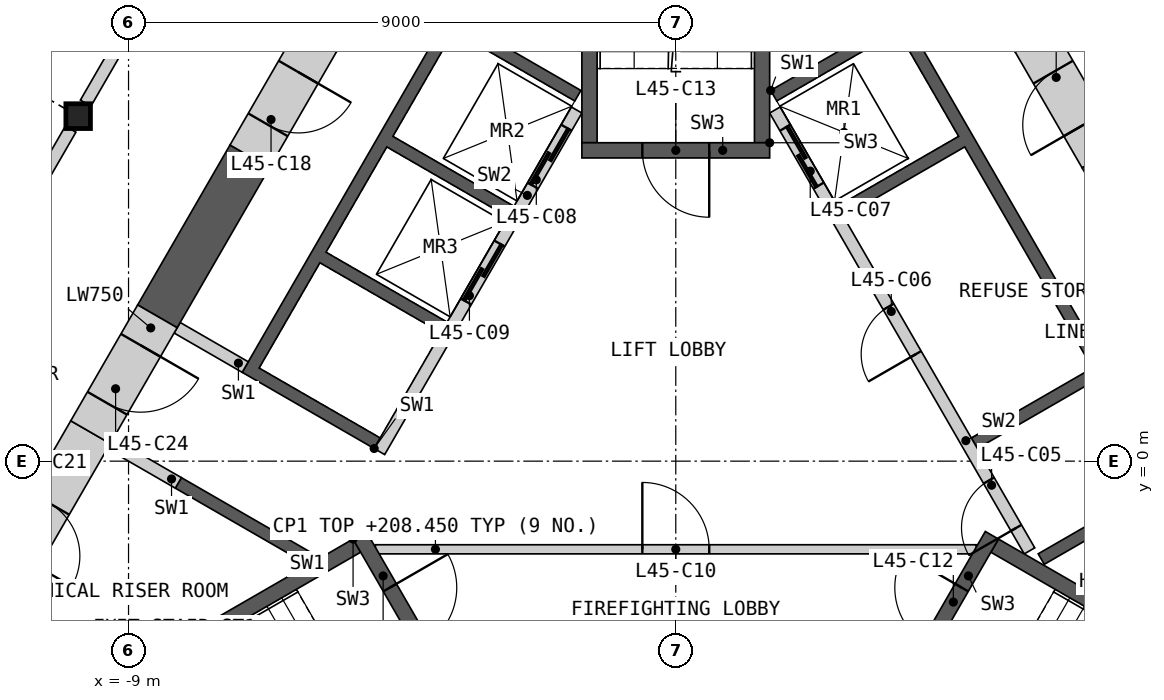
"""IFC4 building model, lengths in metres.
Left out: names, types, materials, properties, quantities, classifications, styles, units other than length and angle.
Written with IfcOpenShell. Run it as: python <this file> out.ifc"""

import sys

from ifc_helpers import new_model, si_unit, direction, frame, frame_2d, origin, origin_2d, place, context, subcontext, project, spatial, polyline, rectangle, i_section, outline, extrude, element, fill, save


model = new_model("IFC4")
c1 = context("Model", 3, precision=1e-05, world=origin(), true_north=direction((0.0, 1.0)))
c2 = subcontext(c1, "Body", "Model", "MODEL_VIEW")
j1 = project(units=[si_unit("LENGTHUNIT", "METRE"), si_unit("PLANEANGLEUNIT", "RADIAN")], contexts=[c1])
p1 = place(None, origin())
s1 = spatial("IfcSite", under=j1, at=p1, CompositionType="ELEMENT")
p2 = place(p1, origin())
s2 = spatial("IfcBuilding", under=s1, at=p2, CompositionType="ELEMENT")
p3 = place(p2, frame((0.0, 0.0, 205.2)))
s3 = spatial("IfcBuildingStorey", under=s2, at=p3, CompositionType="ELEMENT", Elevation=205.2)
p4 = place(p3, frame((-9.828, 5.675, 0.0), z_axis=(0.0, 0.0, 1.0), x_axis=(1.0, 0.0, 0.0)))
e1 = element("IfcColumn", 1, at=p4, inside=s3, PredefinedType="COLUMN", context=c2, shape_type="SweptSolid", body=[
    extrude(i_section(OverallWidth=0.404, OverallDepth=0.407, WebThickness=0.027, FlangeThickness=0.044, at=origin_2d()), origin(), (0.0, 0.0, 1.0), 3.6),
])
p5 = place(p3, origin())
e2 = element("IfcWall", 2, at=p5, inside=s3, PredefinedType="SHEAR", context=c2, shape_type="SweptSolid", body=[
    extrude(outline(polyline([(1.561, 6.097), (3.731, 7.35), (7.131, 1.461), (4.96, 0.208), (4.861, 0.381), (6.852, 1.531), (4.752, 5.169), (2.76, 4.019), (2.66, 4.192), (4.652, 5.342), (3.652, 7.074), (1.66, 5.924), (1.561, 6.097)])), origin(), (0.0, 0.0, 1.0), 3.25),
])
p6 = place(p3, origin())
e3 = element("IfcWall", 3, at=p6, inside=s3, PredefinedType="SHEAR", context=c2, shape_type="SweptSolid", body=[
    extrude(outline(polyline([(8.231, -0.444), (6.061, -1.697), (5.96, -1.524), (8.131, -0.271), (8.231, -0.444)])), origin(), (0.0, 0.0, 1.0), 3.25),
])
p7 = place(p3, frame((5.817, -1.476, 0.0), z_axis=(0.0, 0.0, 1.0), x_axis=(-0.500002616675, 0.866023893041, 0.0)))
e4 = element("IfcWall", 4, at=p7, inside=s3, PredefinedType="SOLIDWALL", context=c2, shape_type="SweptSolid", body=[
    extrude(rectangle(XDim=8.373, YDim=0.2, at=frame_2d((4.187, 0.0))), origin(), (0.0, 0.0, 1.0), 3.25),
])
p8 = place(p7, frame((0.437, 0.0, 0.0)))
e5 = element("IfcOpeningElement", 5, at=p8, cuts=e4, PredefinedType="OPENING", context=c2, shape_type="SweptSolid", body=[
    extrude(rectangle(XDim=0.9, YDim=2.1, at=frame_2d((0.45, 1.05))), frame((0.0, 0.11, 0.0), z_axis=(0.0, -1.0, 0.0), x_axis=(1.0, 0.0, 0.0)), (0.0, 0.0, 1.0), 0.22),
])
p9 = place(p7, frame((3.737, 0.0, 0.0)))
e6 = element("IfcOpeningElement", 6, at=p9, cuts=e4, PredefinedType="OPENING", context=c2, shape_type="SweptSolid", body=[
    extrude(rectangle(XDim=0.9, YDim=2.1, at=frame_2d((0.45, 1.05))), frame((0.0, 0.11, 0.0), z_axis=(0.0, -1.0, 0.0), x_axis=(1.0, 0.0, 0.0)), (0.0, 0.0, 1.0), 0.22),
])
p10 = place(p7, frame((6.937, 0.0, 0.0)))
e7 = element("IfcOpeningElement", 7, at=p10, cuts=e4, PredefinedType="OPENING", context=c2, shape_type="SweptSolid", body=[
    extrude(rectangle(XDim=1.1, YDim=2.1, at=frame_2d((0.55, 1.05))), frame((0.0, 0.11, 0.0), z_axis=(0.0, -1.0, 0.0), x_axis=(1.0, 0.0, 0.0)), (0.0, 0.0, 1.0), 0.22),
])
p11 = place(p3, origin())
e8 = element("IfcWall", 8, at=p11, inside=s3, PredefinedType="SHEAR", context=c2, shape_type="SweptSolid", body=[
    extrude(outline(polyline([(-6.061, -1.697), (-8.231, -0.444), (-8.131, -0.271), (-5.96, -1.524), (-6.061, -1.697)])), origin(), (0.0, 0.0, 1.0), 3.25),
])
p12 = place(p3, origin())
e9 = element("IfcWall", 9, at=p12, inside=s3, PredefinedType="SHEAR", context=c2, shape_type="SweptSolid", body=[
    extrude(outline(polyline([(-4.96, 0.208), (-7.131, 1.461), (-3.731, 7.35), (-1.561, 6.097), (-1.66, 5.924), (-3.652, 7.074), (-4.652, 5.342), (-2.66, 4.192), (-2.76, 4.019), (-4.752, 5.169), (-5.752, 3.437), (-3.76, 2.287), (-3.861, 2.113), (-5.852, 3.263), (-6.852, 1.531), (-4.861, 0.381), (-4.96, 0.208)])), origin(), (0.0, 0.0, 1.0), 3.25),
])
p13 = place(p3, frame((-1.631, 5.776, 0.0), z_axis=(0.0, 0.0, 1.0), x_axis=(-0.499992876559, -0.866029516466, 0.0)))
e10 = element("IfcWall", 10, at=p13, inside=s3, PredefinedType="SOLIDWALL", context=c2, shape_type="SweptSolid", body=[
    extrude(rectangle(XDim=6.486, YDim=0.2, at=frame_2d((3.243, 0.0))), origin(), (0.0, 0.0, 1.0), 3.25),
])
p14 = place(p13, frame((0.337, 0.0, 0.0)))
e11 = element("IfcOpeningElement", 11, at=p14, cuts=e10, PredefinedType="OPENING", context=c2, shape_type="SweptSolid", body=[
    extrude(rectangle(XDim=1.1, YDim=2.1, at=frame_2d((0.55, 1.05))), frame((0.0, 0.11, 0.0), z_axis=(0.0, -1.0, 0.0), x_axis=(1.0, 0.0, 0.0)), (0.0, 0.0, 1.0), 0.22),
])
p15 = place(p13, frame((2.537, 0.0, 0.0)))
e12 = element("IfcOpeningElement", 12, at=p15, cuts=e10, PredefinedType="OPENING", context=c2, shape_type="SweptSolid", body=[
    extrude(rectangle(XDim=1.1, YDim=2.1, at=frame_2d((0.55, 1.05))), frame((0.0, 0.11, 0.0), z_axis=(0.0, -1.0, 0.0), x_axis=(1.0, 0.0, 0.0)), (0.0, 0.0, 1.0), 0.22),
])
for number, where, z_axis, x_axis in (
    (13, (-7.081, 1.548, 0.0), (0.0, 0.0, 1.0), (-0.866, 0.5, 0.0)),
    (14, (-8.181, -0.357, 0.0), (0.0, 0.0, 1.0), (-0.866, 0.5, 0.0)),
):
    element("IfcWall", number, at=place(p3, frame(where, z_axis=z_axis, x_axis=x_axis)), inside=s3, PredefinedType="SHEAR", context=c2, shape_type="SweptSolid", body=[
        extrude(rectangle(XDim=1.293, YDim=0.2, at=frame_2d((0.646, 0.0))), origin(), (0.0, 0.0, 1.0), 3.25),
    ])
p16 = place(p3, frame((-4.941, -1.45, 0.0), z_axis=(0.0, 0.0, 1.0), x_axis=(1.0, 0.0, 0.0)))
e15 = element("IfcWall", 15, at=p16, inside=s3, PredefinedType="PARTITIONING", context=c2, shape_type="SweptSolid", body=[
    extrude(rectangle(XDim=9.882, YDim=0.15, at=frame_2d((4.941, 0.0))), origin(), (0.0, 0.0, 1.0), 3.25),
])
p17 = place(p16, frame((4.391, 0.0, 0.0)))
e16 = element("IfcOpeningElement", 16, at=p17, cuts=e15, PredefinedType="OPENING", context=c2, shape_type="SweptSolid", body=[
    extrude(rectangle(XDim=1.1, YDim=2.1, at=frame_2d((0.55, 1.05))), frame((0.0, 0.085, 0.0), z_axis=(0.0, -1.0, 0.0), x_axis=(1.0, 0.0, 0.0)), (0.0, 0.0, 1.0), 0.17),
])
p18 = place(p3, origin())
e17 = element("IfcWall", 17, at=p18, inside=s3, PredefinedType="SHEAR", context=c2, shape_type="SweptSolid", body=[
    extrude(outline(polyline([(-5.307, -1.281), (-10.374, -4.206), (-10.032, -4.298), (-5.182, -1.498), (-5.307, -1.281)])), origin(), (0.0, 0.0, 1.0), 3.25),
])
p19 = place(p3, frame((-5.199, -1.219, 0.0), z_axis=(0.0, 0.0, 1.0), x_axis=(0.499982516597, -0.866035497597, 0.0)))
e18 = element("IfcWall", 18, at=p19, inside=s3, PredefinedType="SHEAR", context=c2, shape_type="SweptSolid", body=[
    extrude(rectangle(XDim=3.088, YDim=0.25, at=frame_2d((1.544, 0.0))), origin(), (0.0, 0.0, 1.0), 3.25),
])
p20 = place(p19, frame((0.994, 0.0, 0.0)))
e19 = element("IfcOpeningElement", 19, at=p20, cuts=e18, PredefinedType="OPENING", context=c2, shape_type="SweptSolid", body=[
    extrude(rectangle(XDim=1.1, YDim=2.1, at=frame_2d((0.55, 1.05))), frame((0.0, 0.135, 0.0), z_axis=(0.0, -1.0, 0.0), x_axis=(1.0, 0.0, 0.0)), (0.0, 0.0, 1.0), 0.27),
])
p21 = place(p3, origin())
e20 = element("IfcWall", 20, at=p21, inside=s3, PredefinedType="SHEAR", context=c2, shape_type="SweptSolid", body=[
    extrude(outline(polyline([(10.032, -4.298), (10.374, -4.206), (5.307, -1.281), (5.182, -1.498), (10.032, -4.298)])), origin(), (0.0, 0.0, 1.0), 3.25),
])
p22 = place(p3, frame((3.655, -3.893, 0.0), z_axis=(0.0, 0.0, 1.0), x_axis=(0.499982516597, 0.866035497597, 0.0)))
e21 = element("IfcWall", 21, at=p22, inside=s3, PredefinedType="SHEAR", context=c2, shape_type="SweptSolid", body=[
    extrude(rectangle(XDim=3.088, YDim=0.25, at=frame_2d((1.544, 0.0))), origin(), (0.0, 0.0, 1.0), 3.25),
])
p23 = place(p22, frame((0.994, 0.0, 0.0)))
e22 = element("IfcOpeningElement", 22, at=p23, cuts=e21, PredefinedType="OPENING", context=c2, shape_type="SweptSolid", body=[
    extrude(rectangle(XDim=1.1, YDim=2.1, at=frame_2d((0.55, 1.05))), frame((0.0, 0.135, 0.0), z_axis=(0.0, -1.0, 0.0), x_axis=(1.0, 0.0, 0.0)), (0.0, 0.0, 1.0), 0.27),
])
p24 = place(p3, origin())
e23 = element("IfcWall", 23, at=p24, inside=s3, PredefinedType="SHEAR", context=c2, shape_type="SweptSolid", body=[
    extrude(outline(polyline([(1.544, 5.237), (1.544, 11.087), (1.294, 10.837), (1.294, 5.237), (1.544, 5.237)])), origin(), (0.0, 0.0, 1.0), 3.25),
])
p25 = place(p3, origin())
e24 = element("IfcWall", 24, at=p25, inside=s3, PredefinedType="SHEAR", context=c2, shape_type="SweptSolid", body=[
    extrude(outline(polyline([(-1.294, 10.837), (-1.544, 11.087), (-1.544, 5.237), (-1.294, 5.237), (-1.294, 10.837)])), origin(), (0.0, 0.0, 1.0), 3.25),
])
p26 = place(p3, frame((1.544, 5.112, 0.0), z_axis=(0.0, 0.0, 1.0), x_axis=(-1.0, 0.0, 0.0)))
e25 = element("IfcWall", 25, at=p26, inside=s3, PredefinedType="SHEAR", context=c2, shape_type="SweptSolid", body=[
    extrude(rectangle(XDim=3.088, YDim=0.25, at=frame_2d((1.544, 0.0))), origin(), (0.0, 0.0, 1.0), 3.25),
])
p27 = place(p26, frame((0.994, 0.0, 0.0)))
e26 = element("IfcOpeningElement", 26, at=p27, cuts=e25, PredefinedType="OPENING", context=c2, shape_type="SweptSolid", body=[
    extrude(rectangle(XDim=1.1, YDim=2.1, at=frame_2d((0.55, 1.05))), frame((0.0, 0.135, 0.0), z_axis=(0.0, -1.0, 0.0), x_axis=(1.0, 0.0, 0.0)), (0.0, 0.0, 1.0), 0.27),
])
p28 = place(p3, frame((14.526, -8.011, 0.0), z_axis=(0.0, 0.0, 1.0), x_axis=(-0.499996012963, 0.866027705689, 0.0)))
e27 = element("IfcWall", 27, at=p28, inside=s3, PredefinedType="SHEAR", context=c2, shape_type="SweptSolid", body=[
    extrude(rectangle(XDim=15.039, YDim=0.75, at=frame_2d((7.519, 0.0))), origin(), (0.0, 0.0, 1.0), 3.25),
])
p29 = place(p3, frame((-7.006, 5.012, 0.0), z_axis=(0.0, 0.0, 1.0), x_axis=(-0.49996826437, -0.866043725583, 0.0)))
e28 = element("IfcWall", 28, at=p29, inside=s3, PredefinedType="SHEAR", context=c2, shape_type="SweptSolid", body=[
    extrude(rectangle(XDim=3.038, YDim=0.75, at=frame_2d((1.519, 0.0))), origin(), (0.0, 0.0, 1.0), 3.25),
])
p30 = place(p3, frame((-5.906, 6.918, 0.0), z_axis=(0.0, 0.0, 1.0), x_axis=(-0.499946605688, -0.86605622881, 0.0)))
e29 = element("IfcWall", 29, at=p30, inside=s3, PredefinedType="SHEAR", context=c2, shape_type="SweptSolid", body=[
    extrude(rectangle(XDim=2.2, YDim=0.75, at=frame_2d((1.1, 0.0))), origin(), (0.0, 0.0, 1.0), 3.25),
])
p31 = place(p30, frame((0.6, 0.0, 0.0)))
e30 = element("IfcOpeningElement", 30, at=p31, cuts=e29, PredefinedType="OPENING", context=c2, shape_type="SweptSolid", body=[
    extrude(rectangle(XDim=1.0, YDim=2.1, at=frame_2d((0.5, 1.05))), frame((0.0, 0.385, 0.0), z_axis=(0.0, -1.0, 0.0), x_axis=(1.0, 0.0, 0.0)), (0.0, 0.0, 1.0), 0.77),
])
p32 = place(p3, frame((7.006, 5.012, 0.0), z_axis=(0.0, 0.0, 1.0), x_axis=(-0.499946605688, 0.86605622881, 0.0)))
e31 = element("IfcWall", 31, at=p32, inside=s3, PredefinedType="SHEAR", context=c2, shape_type="SweptSolid", body=[
    extrude(rectangle(XDim=2.2, YDim=0.75, at=frame_2d((1.1, 0.0))), origin(), (0.0, 0.0, 1.0), 3.25),
])
p33 = place(p32, frame((0.6, 0.0, 0.0)))
e32 = element("IfcOpeningElement", 32, at=p33, cuts=e31, PredefinedType="OPENING", context=c2, shape_type="SweptSolid", body=[
    extrude(rectangle(XDim=1.0, YDim=2.1, at=frame_2d((0.5, 1.05))), frame((0.0, 0.385, 0.0), z_axis=(0.0, -1.0, 0.0), x_axis=(1.0, 0.0, 0.0)), (0.0, 0.0, 1.0), 0.77),
])
p34 = place(p3, frame((-9.625, 0.477, 0.0), z_axis=(0.0, 0.0, 1.0), x_axis=(-0.500005104963, -0.866022456413, 0.0)))
e33 = element("IfcWall", 33, at=p34, inside=s3, PredefinedType="SHEAR", context=c2, shape_type="SweptSolid", body=[
    extrude(rectangle(XDim=2.941, YDim=0.75, at=frame_2d((1.47, 0.0))), origin(), (0.0, 0.0, 1.0), 3.25),
])
p35 = place(p34, frame((1.35, 0.0, 0.0)))
e34 = element("IfcOpeningElement", 34, at=p35, cuts=e33, PredefinedType="OPENING", context=c2, shape_type="SweptSolid", body=[
    extrude(rectangle(XDim=1.0, YDim=2.1, at=frame_2d((0.5, 1.05))), frame((0.0, 0.385, 0.0), z_axis=(0.0, -1.0, 0.0), x_axis=(1.0, 0.0, 0.0)), (0.0, 0.0, 1.0), 0.77),
])
p36 = place(p3, frame((-8.525, 2.382, 0.0), z_axis=(0.0, 0.0, 1.0), x_axis=(-0.500077893725, -0.86598042715, 0.0)))
e35 = element("IfcWall", 35, at=p36, inside=s3, PredefinedType="SHEAR", context=c2, shape_type="SweptSolid", body=[
    extrude(rectangle(XDim=2.2, YDim=0.75, at=frame_2d((1.1, 0.0))), origin(), (0.0, 0.0, 1.0), 3.25),
])
p37 = place(p36, frame((0.55, 0.0, 0.0)))
e36 = element("IfcOpeningElement", 36, at=p37, cuts=e35, PredefinedType="OPENING", context=c2, shape_type="SweptSolid", body=[
    extrude(rectangle(XDim=1.1, YDim=2.1, at=frame_2d((0.55, 1.05))), frame((0.0, 0.385, 0.0), z_axis=(0.0, -1.0, 0.0), x_axis=(1.0, 0.0, 0.0)), (0.0, 0.0, 1.0), 0.77),
])
p38 = place(p3, frame((5.038, 13.972, 0.0), z_axis=(0.0, 0.0, 1.0), x_axis=(0.50000393355, -0.866023132736, 0.0)))
e37 = element("IfcWall", 37, at=p38, inside=s3, PredefinedType="PARTITIONING", context=c2, shape_type="SweptSolid", body=[
    extrude(rectangle(XDim=9.335, YDim=0.2, at=frame_2d((4.667, 0.0))), origin(), (0.0, 0.0, 1.0), 3.25),
])
p39 = place(p38, frame((4.77, 0.0, 0.0)))
e38 = element("IfcOpeningElement", 38, at=p39, cuts=e37, PredefinedType="OPENING", context=c2, shape_type="SweptSolid", body=[
    extrude(rectangle(XDim=1.0, YDim=2.1, at=frame_2d((0.5, 1.05))), frame((0.0, 0.11, 0.0), z_axis=(0.0, -1.0, 0.0), x_axis=(1.0, 0.0, 0.0)), (0.0, 0.0, 1.0), 0.22),
])
p40 = place(p38, frame((3.163, 0.0, 0.0)))
e39 = element("IfcOpeningElement", 39, at=p40, cuts=e37, PredefinedType="OPENING", context=c2, shape_type="SweptSolid", body=[
    extrude(rectangle(XDim=1.0, YDim=2.1, at=frame_2d((0.5, 1.05))), frame((0.0, 0.11, 0.0), z_axis=(0.0, -1.0, 0.0), x_axis=(1.0, 0.0, 0.0)), (0.0, 0.0, 1.0), 0.22),
])
p41 = place(p3, frame((-9.705, 5.888, 0.0), z_axis=(0.0, 0.0, 1.0), x_axis=(0.50000393355, 0.866023132736, 0.0)))
e40 = element("IfcWall", 40, at=p41, inside=s3, PredefinedType="PARTITIONING", context=c2, shape_type="SweptSolid", body=[
    extrude(rectangle(XDim=9.335, YDim=0.2, at=frame_2d((4.667, 0.0))), origin(), (0.0, 0.0, 1.0), 3.25),
])
p42 = place(p41, frame((1.556, 0.0, 0.0)))
e41 = element("IfcOpeningElement", 41, at=p42, cuts=e40, PredefinedType="OPENING", context=c2, shape_type="SweptSolid", body=[
    extrude(rectangle(XDim=1.8, YDim=2.1, at=frame_2d((0.9, 1.05))), frame((0.0, 0.11, 0.0), z_axis=(0.0, -1.0, 0.0), x_axis=(1.0, 0.0, 0.0)), (0.0, 0.0, 1.0), 0.22),
])
p43 = place(p3, frame((-14.619, -2.624, 0.0), z_axis=(0.0, 0.0, 1.0), x_axis=(0.50000393355, 0.866023132736, 0.0)))
e42 = element("IfcWall", 42, at=p43, inside=s3, PredefinedType="PARTITIONING", context=c2, shape_type="SweptSolid", body=[
    extrude(rectangle(XDim=9.335, YDim=0.2, at=frame_2d((4.667, 0.0))), origin(), (0.0, 0.0, 1.0), 3.25),
])
p44 = place(p43, frame((3.163, 0.0, 0.0)))
e43 = element("IfcOpeningElement", 43, at=p44, cuts=e42, PredefinedType="OPENING", context=c2, shape_type="SweptSolid", body=[
    extrude(rectangle(XDim=1.0, YDim=2.1, at=frame_2d((0.5, 1.05))), frame((0.0, 0.11, 0.0), z_axis=(0.0, -1.0, 0.0), x_axis=(1.0, 0.0, 0.0)), (0.0, 0.0, 1.0), 0.22),
])
p45 = place(p8, origin())
e44 = element("IfcDoor", 44, at=p45, inside=s3, OperationType="SINGLE_SWING_LEFT", PredefinedType="DOOR", context=c2, shape_type="SweptSolid", body=[
    extrude(rectangle(XDim=0.9, YDim=2.1, at=frame_2d((0.45, 1.05))), frame((0.0, 0.025, 0.0), z_axis=(0.0, -1.0, 0.0), x_axis=(1.0, 0.0, 0.0)), (0.0, 0.0, 1.0), 0.05),
])
fill(e5, e44)
p46 = place(p9, origin())
e45 = element("IfcDoor", 45, at=p46, inside=s3, OperationType="SINGLE_SWING_LEFT", PredefinedType="DOOR", context=c2, shape_type="SweptSolid", body=[
    extrude(rectangle(XDim=0.9, YDim=2.1, at=frame_2d((0.45, 1.05))), frame((0.0, 0.025, 0.0), z_axis=(0.0, -1.0, 0.0), x_axis=(1.0, 0.0, 0.0)), (0.0, 0.0, 1.0), 0.05),
])
fill(e6, e45)
p47 = place(p10, origin())
e46 = element("IfcDoor", 46, at=p47, inside=s3, OperationType="SLIDING_TO_LEFT", PredefinedType="DOOR", context=c2, shape_type="SweptSolid", body=[
    extrude(rectangle(XDim=1.1, YDim=2.1, at=frame_2d((0.55, 1.05))), frame((0.0, 0.025, 0.0), z_axis=(0.0, -1.0, 0.0), x_axis=(1.0, 0.0, 0.0)), (0.0, 0.0, 1.0), 0.05),
])
fill(e7, e46)
p48 = place(p14, origin())
e47 = element("IfcDoor", 47, at=p48, inside=s3, OperationType="SLIDING_TO_LEFT", PredefinedType="DOOR", context=c2, shape_type="SweptSolid", body=[
    extrude(rectangle(XDim=1.1, YDim=2.1, at=frame_2d((0.55, 1.05))), frame((0.0, 0.025, 0.0), z_axis=(0.0, -1.0, 0.0), x_axis=(1.0, 0.0, 0.0)), (0.0, 0.0, 1.0), 0.05),
])
fill(e11, e47)
p49 = place(p15, origin())
e48 = element("IfcDoor", 48, at=p49, inside=s3, OperationType="SLIDING_TO_LEFT", PredefinedType="DOOR", context=c2, shape_type="SweptSolid", body=[
    extrude(rectangle(XDim=1.1, YDim=2.1, at=frame_2d((0.55, 1.05))), frame((0.0, 0.025, 0.0), z_axis=(0.0, -1.0, 0.0), x_axis=(1.0, 0.0, 0.0)), (0.0, 0.0, 1.0), 0.05),
])
fill(e12, e48)
p50 = place(p17, origin())
e49 = element("IfcDoor", 49, at=p50, inside=s3, OperationType="SINGLE_SWING_LEFT", PredefinedType="DOOR", context=c2, shape_type="SweptSolid", body=[
    extrude(rectangle(XDim=1.1, YDim=2.1, at=frame_2d((0.55, 1.05))), frame((0.0, 0.025, 0.0), z_axis=(0.0, -1.0, 0.0), x_axis=(1.0, 0.0, 0.0)), (0.0, 0.0, 1.0), 0.05),
])
fill(e16, e49)
p51 = place(p20, origin())
e50 = element("IfcDoor", 50, at=p51, inside=s3, OperationType="SINGLE_SWING_LEFT", PredefinedType="DOOR", context=c2, shape_type="SweptSolid", body=[
    extrude(rectangle(XDim=1.1, YDim=2.1, at=frame_2d((0.55, 1.05))), frame((0.0, 0.025, 0.0), z_axis=(0.0, -1.0, 0.0), x_axis=(1.0, 0.0, 0.0)), (0.0, 0.0, 1.0), 0.05),
])
fill(e19, e50)
p52 = place(p23, origin())
e51 = element("IfcDoor", 51, at=p52, inside=s3, OperationType="SINGLE_SWING_RIGHT", PredefinedType="DOOR", context=c2, shape_type="SweptSolid", body=[
    extrude(rectangle(XDim=1.1, YDim=2.1, at=frame_2d((0.55, 1.05))), frame((0.0, 0.025, 0.0), z_axis=(0.0, -1.0, 0.0), x_axis=(1.0, 0.0, 0.0)), (0.0, 0.0, 1.0), 0.05),
])
fill(e22, e51)
p53 = place(p27, origin())
e52 = element("IfcDoor", 52, at=p53, inside=s3, OperationType="SINGLE_SWING_LEFT", PredefinedType="DOOR", context=c2, shape_type="SweptSolid", body=[
    extrude(rectangle(XDim=1.1, YDim=2.1, at=frame_2d((0.55, 1.05))), frame((0.0, 0.025, 0.0), z_axis=(0.0, -1.0, 0.0), x_axis=(1.0, 0.0, 0.0)), (0.0, 0.0, 1.0), 0.05),
])
fill(e26, e52)
p54 = place(p31, origin())
e53 = element("IfcDoor", 53, at=p54, inside=s3, OperationType="SINGLE_SWING_LEFT", PredefinedType="DOOR", context=c2, shape_type="SweptSolid", body=[
    extrude(rectangle(XDim=1.0, YDim=2.1, at=frame_2d((0.5, 1.05))), frame((0.0, 0.13, 0.0), z_axis=(0.0, -1.0, 0.0), x_axis=(1.0, 0.0, 0.0)), (0.0, 0.0, 1.0), 0.05),
])
fill(e30, e53)
p55 = place(p33, origin())
e54 = element("IfcDoor", 54, at=p55, inside=s3, OperationType="SINGLE_SWING_LEFT", PredefinedType="DOOR", context=c2, shape_type="SweptSolid", body=[
    extrude(rectangle(XDim=1.0, YDim=2.1, at=frame_2d((0.5, 1.05))), frame((0.0, 0.13, 0.0), z_axis=(0.0, -1.0, 0.0), x_axis=(1.0, 0.0, 0.0)), (0.0, 0.0, 1.0), 0.05),
])
fill(e32, e54)
p56 = place(p35, origin())
e55 = element("IfcDoor", 55, at=p56, inside=s3, OperationType="SINGLE_SWING_RIGHT", PredefinedType="DOOR", context=c2, shape_type="SweptSolid", body=[
    extrude(rectangle(XDim=1.0, YDim=2.1, at=frame_2d((0.5, 1.05))), frame((0.0, 0.13, 0.0), z_axis=(0.0, -1.0, 0.0), x_axis=(1.0, 0.0, 0.0)), (0.0, 0.0, 1.0), 0.05),
])
fill(e34, e55)
p57 = place(p37, origin())
e56 = element("IfcDoor", 56, at=p57, inside=s3, OperationType="SINGLE_SWING_LEFT", PredefinedType="DOOR", context=c2, shape_type="SweptSolid", body=[
    extrude(rectangle(XDim=1.1, YDim=2.1, at=frame_2d((0.55, 1.05))), frame((0.0, 0.13, 0.0), z_axis=(0.0, -1.0, 0.0), x_axis=(1.0, 0.0, 0.0)), (0.0, 0.0, 1.0), 0.05),
])
fill(e36, e56)
save(model, sys.argv[1])
